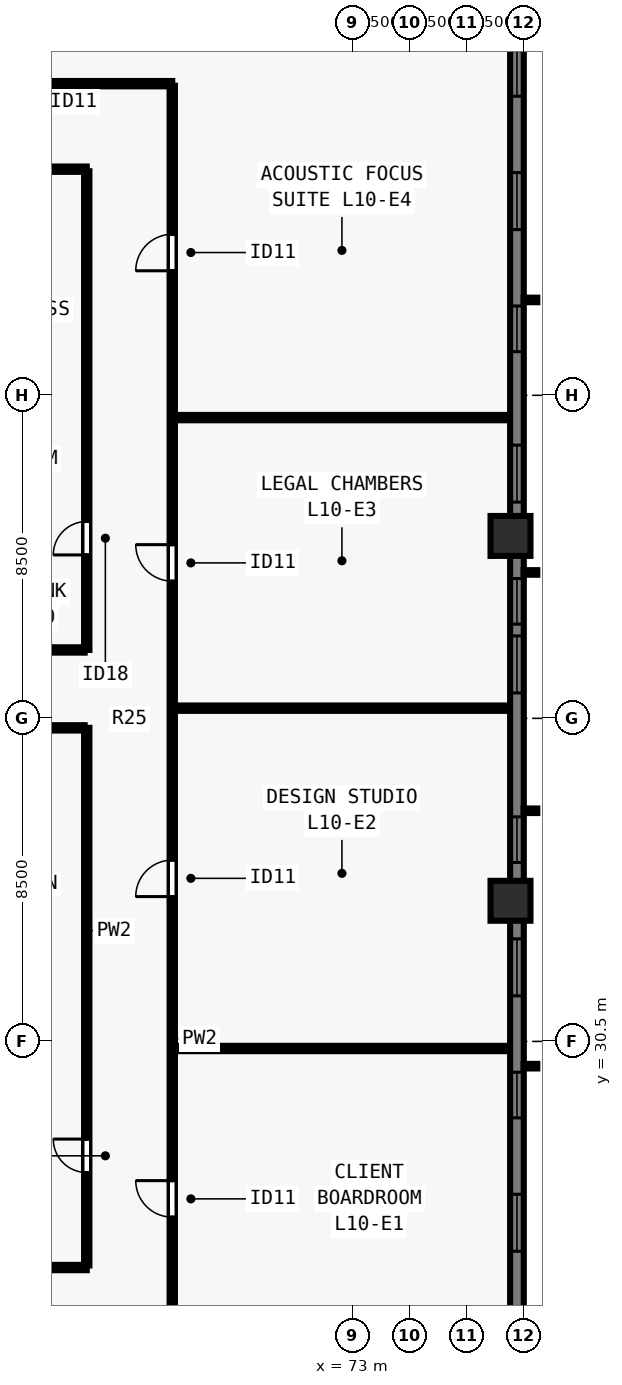
"""IFC4 building model, lengths in metres.
Left out: names, types, materials, properties, quantities, classifications, styles, units other than length and angle.
Written with IfcOpenShell. Run it as: python <this file> out.ifc"""

import sys

from ifc_helpers import new_model, si_unit, direction, frame, frame_2d, origin, origin_2d, place, context, subcontext, project, spatial, rectangle, extrude, element, fill, save


model = new_model("IFC4")
c1 = context("Model", 3, precision=1e-05, world=origin(), true_north=direction((0.0, 1.0)))
c2 = subcontext(c1, "Body", "Model", "MODEL_VIEW")
j1 = project(units=[si_unit("LENGTHUNIT", "METRE"), si_unit("PLANEANGLEUNIT", "RADIAN")], contexts=[c1])
p1 = place(None, origin())
s1 = spatial("IfcSite", under=j1, at=p1, CompositionType="ELEMENT")
p2 = place(p1, origin())
s2 = spatial("IfcBuilding", under=s1, at=p2, CompositionType="ELEMENT")
p3 = place(p2, frame((0.0, 0.0, 41.0)))
s3 = spatial("IfcBuildingStorey", under=s2, at=p3, CompositionType="ELEMENT", Elevation=41.0)
for number, where, z_axis, x_axis in (
    (1, (77.15, 34.2, 0.0), (0.0, 0.0, 1.0), (0.0, 1.0, 0.0)),
    (2, (77.15, 43.8, 0.0), (0.0, 0.0, 1.0), (0.0, 1.0, 0.0)),
):
    element("IfcColumn", number, at=place(p3, frame(where, z_axis=z_axis, x_axis=x_axis)), inside=s3, PredefinedType="COLUMN", context=c2, shape_type="SweptSolid", body=[
        extrude(rectangle(XDim=1.05, YDim=1.05, at=origin_2d()), origin(), (0.0, 0.0, 1.0), 3.5),
    ])
p4 = place(p3, frame((77.32, 61.5, 0.0), z_axis=(0.0, 0.0, 1.0), x_axis=(0.0, -1.0, 0.0)))
e3 = element("IfcWall", 3, at=p4, inside=s3, PredefinedType="SOLIDWALL", context=c2, shape_type="SweptSolid", body=[
    extrude(rectangle(XDim=44.662, YDim=0.36, at=frame_2d((22.331, 0.0))), origin(), (0.0, 0.0, 1.0), 3.28),
])
p5 = place(p4, frame((4.93, 0.0, 0.8)))
e4 = element("IfcOpeningElement", 4, at=p5, cuts=e3, PredefinedType="OPENING", context=c2, shape_type="SweptSolid", body=[
    extrude(rectangle(XDim=1.2, YDim=1.544, at=frame_2d((0.6, 0.772))), frame((0.0, 0.19, 0.0), z_axis=(0.0, -1.0, 0.0), x_axis=(1.0, 0.0, 0.0)), (0.0, 0.0, 1.0), 0.38),
])
p6 = place(p4, frame((8.14, 0.0, 0.8)))
e5 = element("IfcOpeningElement", 5, at=p6, cuts=e3, PredefinedType="OPENING", context=c2, shape_type="SweptSolid", body=[
    extrude(rectangle(XDim=1.5, YDim=1.544, at=frame_2d((0.75, 0.772))), frame((0.0, 0.19, 0.0), z_axis=(0.0, -1.0, 0.0), x_axis=(1.0, 0.0, 0.0)), (0.0, 0.0, 1.0), 0.38),
])
p7 = place(p4, frame((11.65, 0.0, 0.8)))
e6 = element("IfcOpeningElement", 6, at=p7, cuts=e3, PredefinedType="OPENING", context=c2, shape_type="SweptSolid", body=[
    extrude(rectangle(XDim=1.2, YDim=1.544, at=frame_2d((0.6, 0.772))), frame((0.0, 0.19, 0.0), z_axis=(0.0, -1.0, 0.0), x_axis=(1.0, 0.0, 0.0)), (0.0, 0.0, 1.0), 0.38),
])
p8 = place(p4, frame((15.311, 0.0, 0.8)))
e7 = element("IfcOpeningElement", 7, at=p8, cuts=e3, PredefinedType="OPENING", context=c2, shape_type="SweptSolid", body=[
    extrude(rectangle(XDim=1.5, YDim=1.544, at=frame_2d((0.75, 0.772))), frame((0.0, 0.19, 0.0), z_axis=(0.0, -1.0, 0.0), x_axis=(1.0, 0.0, 0.0)), (0.0, 0.0, 1.0), 0.38),
])
p9 = place(p4, frame((18.821, 0.0, 0.8)))
e8 = element("IfcOpeningElement", 8, at=p9, cuts=e3, PredefinedType="OPENING", context=c2, shape_type="SweptSolid", body=[
    extrude(rectangle(XDim=1.2, YDim=1.544, at=frame_2d((0.6, 0.772))), frame((0.0, 0.19, 0.0), z_axis=(0.0, -1.0, 0.0), x_axis=(1.0, 0.0, 0.0)), (0.0, 0.0, 1.0), 0.38),
])
p10 = place(p4, frame((20.331, 0.0, 0.8)))
e9 = element("IfcOpeningElement", 9, at=p10, cuts=e3, PredefinedType="OPENING", context=c2, shape_type="SweptSolid", body=[
    extrude(rectangle(XDim=1.5, YDim=1.544, at=frame_2d((0.75, 0.772))), frame((0.0, 0.19, 0.0), z_axis=(0.0, -1.0, 0.0), x_axis=(1.0, 0.0, 0.0)), (0.0, 0.0, 1.0), 0.38),
])
p11 = place(p4, frame((25.091, 0.0, 0.8)))
e10 = element("IfcOpeningElement", 10, at=p11, cuts=e3, PredefinedType="OPENING", context=c2, shape_type="SweptSolid", body=[
    extrude(rectangle(XDim=1.2, YDim=1.544, at=frame_2d((0.6, 0.772))), frame((0.0, 0.19, 0.0), z_axis=(0.0, -1.0, 0.0), x_axis=(1.0, 0.0, 0.0)), (0.0, 0.0, 1.0), 0.38),
])
p12 = place(p4, frame((28.302, 0.0, 0.8)))
e11 = element("IfcOpeningElement", 11, at=p12, cuts=e3, PredefinedType="OPENING", context=c2, shape_type="SweptSolid", body=[
    extrude(rectangle(XDim=1.5, YDim=1.544, at=frame_2d((0.75, 0.772))), frame((0.0, 0.19, 0.0), z_axis=(0.0, -1.0, 0.0), x_axis=(1.0, 0.0, 0.0)), (0.0, 0.0, 1.0), 0.38),
])
p13 = place(p4, frame((31.812, 0.0, 0.8)))
e12 = element("IfcOpeningElement", 12, at=p13, cuts=e3, PredefinedType="OPENING", context=c2, shape_type="SweptSolid", body=[
    extrude(rectangle(XDim=1.2, YDim=1.544, at=frame_2d((0.6, 0.772))), frame((0.0, 0.19, 0.0), z_axis=(0.0, -1.0, 0.0), x_axis=(1.0, 0.0, 0.0)), (0.0, 0.0, 1.0), 0.38),
])
p14 = place(p4, frame((35.022, 0.0, 0.8)))
e13 = element("IfcOpeningElement", 13, at=p14, cuts=e3, PredefinedType="OPENING", context=c2, shape_type="SweptSolid", body=[
    extrude(rectangle(XDim=1.5, YDim=1.544, at=frame_2d((0.75, 0.772))), frame((0.0, 0.19, 0.0), z_axis=(0.0, -1.0, 0.0), x_axis=(1.0, 0.0, 0.0)), (0.0, 0.0, 1.0), 0.38),
])
p15 = place(p4, frame((38.532, 0.0, 0.8)))
e14 = element("IfcOpeningElement", 14, at=p15, cuts=e3, PredefinedType="OPENING", context=c2, shape_type="SweptSolid", body=[
    extrude(rectangle(XDim=1.2, YDim=1.544, at=frame_2d((0.6, 0.772))), frame((0.0, 0.19, 0.0), z_axis=(0.0, -1.0, 0.0), x_axis=(1.0, 0.0, 0.0)), (0.0, 0.0, 1.0), 0.38),
])
p16 = place(p3, frame((35.75, 55.7, 0.0), z_axis=(0.0, 0.0, 1.0), x_axis=(1.0, 0.0, 0.0)))
e15 = element("IfcWall", 15, at=p16, inside=s3, PredefinedType="PARTITIONING", context=c2, shape_type="SweptSolid", body=[
    extrude(rectangle(XDim=32.5, YDim=0.14, at=frame_2d((16.25, 0.0))), origin(), (0.0, 0.0, 1.0), 3.28),
])
p17 = place(p16, frame((3.154, 0.0, 0.0)))
e16 = element("IfcOpeningElement", 16, at=p17, cuts=e15, PredefinedType="OPENING", context=c2, shape_type="SweptSolid", body=[
    extrude(rectangle(XDim=0.96, YDim=2.12, at=frame_2d((0.48, 1.06))), frame((0.0, 0.08, 0.0), z_axis=(0.0, -1.0, 0.0), x_axis=(1.0, 0.0, 0.0)), (0.0, 0.0, 1.0), 0.16),
])
p18 = place(p16, frame((27.834, 0.0, 0.0)))
e17 = element("IfcOpeningElement", 17, at=p18, cuts=e15, PredefinedType="OPENING", context=c2, shape_type="SweptSolid", body=[
    extrude(rectangle(XDim=0.96, YDim=2.12, at=frame_2d((0.48, 1.06))), frame((0.0, 0.08, 0.0), z_axis=(0.0, -1.0, 0.0), x_axis=(1.0, 0.0, 0.0)), (0.0, 0.0, 1.0), 0.16),
])
p19 = place(p3, frame((68.25, 22.355, 0.0), z_axis=(0.0, 0.0, 1.0), x_axis=(0.0, 1.0, 0.0)))
e18 = element("IfcWall", 18, at=p19, inside=s3, PredefinedType="PARTITIONING", context=c2, shape_type="SweptSolid", body=[
    extrude(rectangle(XDim=33.29, YDim=0.14, at=frame_2d((16.645, 0.0))), origin(), (0.0, 0.0, 1.0), 3.28),
])
p20 = place(p19, frame((3.522, 0.0, 0.0)))
e19 = element("IfcOpeningElement", 19, at=p20, cuts=e18, PredefinedType="OPENING", context=c2, shape_type="SweptSolid", body=[
    extrude(rectangle(XDim=0.96, YDim=2.12, at=frame_2d((0.48, 1.06))), frame((0.0, 0.08, 0.0), z_axis=(0.0, -1.0, 0.0), x_axis=(1.0, 0.0, 0.0)), (0.0, 0.0, 1.0), 0.16),
])
p21 = place(p19, frame((11.956, 0.0, 0.0)))
e20 = element("IfcOpeningElement", 20, at=p21, cuts=e18, PredefinedType="OPENING", context=c2, shape_type="SweptSolid", body=[
    extrude(rectangle(XDim=0.96, YDim=2.12, at=frame_2d((0.48, 1.06))), frame((0.0, 0.08, 0.0), z_axis=(0.0, -1.0, 0.0), x_axis=(1.0, 0.0, 0.0)), (0.0, 0.0, 1.0), 0.16),
])
p22 = place(p19, frame((20.256, 0.0, 0.0)))
e21 = element("IfcOpeningElement", 21, at=p22, cuts=e18, PredefinedType="OPENING", context=c2, shape_type="SweptSolid", body=[
    extrude(rectangle(XDim=0.96, YDim=2.12, at=frame_2d((0.48, 1.06))), frame((0.0, 0.08, 0.0), z_axis=(0.0, -1.0, 0.0), x_axis=(1.0, 0.0, 0.0)), (0.0, 0.0, 1.0), 0.16),
])
p23 = place(p19, frame((28.422, 0.0, 0.0)))
e22 = element("IfcOpeningElement", 22, at=p23, cuts=e18, PredefinedType="OPENING", context=c2, shape_type="SweptSolid", body=[
    extrude(rectangle(XDim=0.96, YDim=2.12, at=frame_2d((0.48, 1.06))), frame((0.0, 0.08, 0.0), z_axis=(0.0, -1.0, 0.0), x_axis=(1.0, 0.0, 0.0)), (0.0, 0.0, 1.0), 0.16),
])
p24 = place(p3, frame((38.0, 24.55, 0.0), z_axis=(0.0, 0.0, 1.0), x_axis=(1.0, 0.0, 0.0)))
e23 = element("IfcWall", 23, at=p24, inside=s3, PredefinedType="PARTITIONING", context=c2, shape_type="SweptSolid", body=[
    extrude(rectangle(XDim=28.0, YDim=0.14, at=frame_2d((14.0, 0.0))), origin(), (0.0, 0.0, 1.0), 3.28),
])
p25 = place(p24, frame((1.2, 0.0, 0.0)))
e24 = element("IfcOpeningElement", 24, at=p25, cuts=e23, PredefinedType="OPENING", context=c2, shape_type="SweptSolid", body=[
    extrude(rectangle(XDim=0.88, YDim=2.1, at=frame_2d((0.44, 1.05))), frame((0.0, 0.08, 0.0), z_axis=(0.0, -1.0, 0.0), x_axis=(1.0, 0.0, 0.0)), (0.0, 0.0, 1.0), 0.16),
])
p26 = place(p24, frame((10.5, 0.0, 0.0)))
e25 = element("IfcOpeningElement", 25, at=p26, cuts=e23, PredefinedType="OPENING", context=c2, shape_type="SweptSolid", body=[
    extrude(rectangle(XDim=0.88, YDim=2.1, at=frame_2d((0.44, 1.05))), frame((0.0, 0.08, 0.0), z_axis=(0.0, -1.0, 0.0), x_axis=(1.0, 0.0, 0.0)), (0.0, 0.0, 1.0), 0.16),
])
p27 = place(p24, frame((21.0, 0.0, 0.0)))
e26 = element("IfcOpeningElement", 26, at=p27, cuts=e23, PredefinedType="OPENING", context=c2, shape_type="SweptSolid", body=[
    extrude(rectangle(XDim=0.88, YDim=2.1, at=frame_2d((0.44, 1.05))), frame((0.0, 0.08, 0.0), z_axis=(0.0, -1.0, 0.0), x_axis=(1.0, 0.0, 0.0)), (0.0, 0.0, 1.0), 0.16),
])
p28 = place(p3, frame((38.0, 53.45, 0.0), z_axis=(0.0, 0.0, 1.0), x_axis=(1.0, 0.0, 0.0)))
e27 = element("IfcWall", 27, at=p28, inside=s3, PredefinedType="PARTITIONING", context=c2, shape_type="SweptSolid", body=[
    extrude(rectangle(XDim=28.0, YDim=0.14, at=frame_2d((14.0, 0.0))), origin(), (0.0, 0.0, 1.0), 3.28),
])
p29 = place(p28, frame((2.2, 0.0, 0.0)))
e28 = element("IfcOpeningElement", 28, at=p29, cuts=e27, PredefinedType="OPENING", context=c2, shape_type="SweptSolid", body=[
    extrude(rectangle(XDim=0.88, YDim=2.1, at=frame_2d((0.44, 1.05))), frame((0.0, 0.08, 0.0), z_axis=(0.0, -1.0, 0.0), x_axis=(1.0, 0.0, 0.0)), (0.0, 0.0, 1.0), 0.16),
])
p30 = place(p28, frame((14.5, 0.0, 0.0)))
e29 = element("IfcOpeningElement", 29, at=p30, cuts=e27, PredefinedType="OPENING", context=c2, shape_type="SweptSolid", body=[
    extrude(rectangle(XDim=0.88, YDim=2.1, at=frame_2d((0.44, 1.05))), frame((0.0, 0.08, 0.0), z_axis=(0.0, -1.0, 0.0), x_axis=(1.0, 0.0, 0.0)), (0.0, 0.0, 1.0), 0.16),
])
p31 = place(p28, frame((24.0, 0.0, 0.0)))
e30 = element("IfcOpeningElement", 30, at=p31, cuts=e27, PredefinedType="OPENING", context=c2, shape_type="SweptSolid", body=[
    extrude(rectangle(XDim=0.88, YDim=2.1, at=frame_2d((0.44, 1.05))), frame((0.0, 0.08, 0.0), z_axis=(0.0, -1.0, 0.0), x_axis=(1.0, 0.0, 0.0)), (0.0, 0.0, 1.0), 0.16),
])
p32 = place(p3, frame((66.0, 24.605, 0.0), z_axis=(0.0, 0.0, 1.0), x_axis=(0.0, 1.0, 0.0)))
e31 = element("IfcWall", 31, at=p32, inside=s3, PredefinedType="PARTITIONING", context=c2, shape_type="SweptSolid", body=[
    extrude(rectangle(XDim=14.145, YDim=0.14, at=frame_2d((7.073, 0.0))), origin(), (0.0, 0.0, 1.0), 3.28),
])
p33 = place(p32, frame((2.445, 0.0, 0.0)))
e32 = element("IfcOpeningElement", 32, at=p33, cuts=e31, PredefinedType="OPENING", context=c2, shape_type="SweptSolid", body=[
    extrude(rectangle(XDim=0.88, YDim=2.1, at=frame_2d((0.44, 1.05))), frame((0.0, 0.08, 0.0), z_axis=(0.0, -1.0, 0.0), x_axis=(1.0, 0.0, 0.0)), (0.0, 0.0, 1.0), 0.16),
])
p34 = place(p3, frame((66.0, 40.8, 0.0), z_axis=(0.0, 0.0, 1.0), x_axis=(0.0, 1.0, 0.0)))
e33 = element("IfcWall", 33, at=p34, inside=s3, PredefinedType="PARTITIONING", context=c2, shape_type="SweptSolid", body=[
    extrude(rectangle(XDim=12.595, YDim=0.14, at=frame_2d((6.297, 0.0))), origin(), (0.0, 0.0, 1.0), 3.28),
])
p35 = place(p34, frame((2.5, 0.0, 0.0)))
e34 = element("IfcOpeningElement", 34, at=p35, cuts=e33, PredefinedType="OPENING", context=c2, shape_type="SweptSolid", body=[
    extrude(rectangle(XDim=0.88, YDim=2.1, at=frame_2d((0.44, 1.05))), frame((0.0, 0.08, 0.0), z_axis=(0.0, -1.0, 0.0), x_axis=(1.0, 0.0, 0.0)), (0.0, 0.0, 1.0), 0.16),
])
for number, where, z_axis, x_axis in (
    (35, (60.76, 38.75, 0.0), (0.0, 0.0, 1.0), (1.0, 0.0, 0.0)),
    (36, (60.76, 40.8, 0.0), (0.0, 0.0, 1.0), (1.0, 0.0, 0.0)),
):
    element("IfcWall", number, at=place(p3, frame(where, z_axis=z_axis, x_axis=x_axis)), inside=s3, PredefinedType="PARTITIONING", context=c2, shape_type="SweptSolid", body=[
        extrude(rectangle(XDim=5.185, YDim=0.14, at=frame_2d((2.593, 0.0))), origin(), (0.0, 0.0, 1.0), 3.28),
    ])
for number, where, z_axis, x_axis in (
    (37, (68.35, 30.313, 0.0), (0.0, 0.0, 1.0), (1.0, 0.0, 0.0)),
    (38, (68.35, 39.268, 0.0), (0.0, 0.0, 1.0), (1.0, 0.0, 0.0)),
    (39, (68.35, 46.913, 0.0), (0.0, 0.0, 1.0), (1.0, 0.0, 0.0)),
):
    element("IfcWall", number, at=place(p3, frame(where, z_axis=z_axis, x_axis=x_axis)), inside=s3, PredefinedType="PARTITIONING", context=c2, shape_type="SweptSolid", body=[
        extrude(rectangle(XDim=8.73, YDim=0.14, at=frame_2d((4.365, 0.0))), origin(), (0.0, 0.0, 1.0), 3.28),
    ])
p36 = place(p5, origin())
e40 = element("IfcWindow", 40, at=p36, inside=s3, PartitioningType="SINGLE_PANEL", PredefinedType="WINDOW", context=c2, shape_type="SweptSolid", body=[
    extrude(rectangle(XDim=1.2, YDim=1.544, at=frame_2d((0.6, 0.772))), frame((0.0, -0.05, 0.0), z_axis=(0.0, -1.0, 0.0), x_axis=(1.0, 0.0, 0.0)), (0.0, 0.0, 1.0), 0.06),
])
fill(e4, e40)
p37 = place(p6, origin())
e41 = element("IfcWindow", 41, at=p37, inside=s3, PartitioningType="SINGLE_PANEL", PredefinedType="WINDOW", context=c2, shape_type="SweptSolid", body=[
    extrude(rectangle(XDim=1.5, YDim=1.544, at=frame_2d((0.75, 0.772))), frame((0.0, -0.05, 0.0), z_axis=(0.0, -1.0, 0.0), x_axis=(1.0, 0.0, 0.0)), (0.0, 0.0, 1.0), 0.06),
])
fill(e5, e41)
p38 = place(p7, origin())
e42 = element("IfcWindow", 42, at=p38, inside=s3, PartitioningType="SINGLE_PANEL", PredefinedType="WINDOW", context=c2, shape_type="SweptSolid", body=[
    extrude(rectangle(XDim=1.2, YDim=1.544, at=frame_2d((0.6, 0.772))), frame((0.0, -0.05, 0.0), z_axis=(0.0, -1.0, 0.0), x_axis=(1.0, 0.0, 0.0)), (0.0, 0.0, 1.0), 0.06),
])
fill(e6, e42)
p39 = place(p8, origin())
e43 = element("IfcWindow", 43, at=p39, inside=s3, PartitioningType="SINGLE_PANEL", PredefinedType="WINDOW", context=c2, shape_type="SweptSolid", body=[
    extrude(rectangle(XDim=1.5, YDim=1.544, at=frame_2d((0.75, 0.772))), frame((0.0, -0.05, 0.0), z_axis=(0.0, -1.0, 0.0), x_axis=(1.0, 0.0, 0.0)), (0.0, 0.0, 1.0), 0.06),
])
fill(e7, e43)
p40 = place(p9, origin())
e44 = element("IfcWindow", 44, at=p40, inside=s3, PartitioningType="SINGLE_PANEL", PredefinedType="WINDOW", context=c2, shape_type="SweptSolid", body=[
    extrude(rectangle(XDim=1.2, YDim=1.544, at=frame_2d((0.6, 0.772))), frame((0.0, -0.05, 0.0), z_axis=(0.0, -1.0, 0.0), x_axis=(1.0, 0.0, 0.0)), (0.0, 0.0, 1.0), 0.06),
])
fill(e8, e44)
p41 = place(p10, origin())
e45 = element("IfcWindow", 45, at=p41, inside=s3, PartitioningType="SINGLE_PANEL", PredefinedType="WINDOW", context=c2, shape_type="SweptSolid", body=[
    extrude(rectangle(XDim=1.5, YDim=1.544, at=frame_2d((0.75, 0.772))), frame((0.0, -0.05, 0.0), z_axis=(0.0, -1.0, 0.0), x_axis=(1.0, 0.0, 0.0)), (0.0, 0.0, 1.0), 0.06),
])
fill(e9, e45)
p42 = place(p11, origin())
e46 = element("IfcWindow", 46, at=p42, inside=s3, PartitioningType="SINGLE_PANEL", PredefinedType="WINDOW", context=c2, shape_type="SweptSolid", body=[
    extrude(rectangle(XDim=1.2, YDim=1.544, at=frame_2d((0.6, 0.772))), frame((0.0, -0.05, 0.0), z_axis=(0.0, -1.0, 0.0), x_axis=(1.0, 0.0, 0.0)), (0.0, 0.0, 1.0), 0.06),
])
fill(e10, e46)
p43 = place(p12, origin())
e47 = element("IfcWindow", 47, at=p43, inside=s3, PartitioningType="SINGLE_PANEL", PredefinedType="WINDOW", context=c2, shape_type="SweptSolid", body=[
    extrude(rectangle(XDim=1.5, YDim=1.544, at=frame_2d((0.75, 0.772))), frame((0.0, -0.05, 0.0), z_axis=(0.0, -1.0, 0.0), x_axis=(1.0, 0.0, 0.0)), (0.0, 0.0, 1.0), 0.06),
])
fill(e11, e47)
p44 = place(p13, origin())
e48 = element("IfcWindow", 48, at=p44, inside=s3, PartitioningType="SINGLE_PANEL", PredefinedType="WINDOW", context=c2, shape_type="SweptSolid", body=[
    extrude(rectangle(XDim=1.2, YDim=1.544, at=frame_2d((0.6, 0.772))), frame((0.0, -0.05, 0.0), z_axis=(0.0, -1.0, 0.0), x_axis=(1.0, 0.0, 0.0)), (0.0, 0.0, 1.0), 0.06),
])
fill(e12, e48)
p45 = place(p14, origin())
e49 = element("IfcWindow", 49, at=p45, inside=s3, PartitioningType="SINGLE_PANEL", PredefinedType="WINDOW", context=c2, shape_type="SweptSolid", body=[
    extrude(rectangle(XDim=1.5, YDim=1.544, at=frame_2d((0.75, 0.772))), frame((0.0, -0.05, 0.0), z_axis=(0.0, -1.0, 0.0), x_axis=(1.0, 0.0, 0.0)), (0.0, 0.0, 1.0), 0.06),
])
fill(e13, e49)
p46 = place(p33, origin())
e50 = element("IfcDoor", 50, at=p46, inside=s3, OperationType="SINGLE_SWING_RIGHT", PredefinedType="DOOR", context=c2, shape_type="SweptSolid", body=[
    extrude(rectangle(XDim=0.88, YDim=2.1, at=frame_2d((0.44, 1.05))), frame((0.0, 0.025, 0.0), z_axis=(0.0, -1.0, 0.0), x_axis=(1.0, 0.0, 0.0)), (0.0, 0.0, 1.0), 0.05),
])
fill(e32, e50)
p47 = place(p35, origin())
e51 = element("IfcDoor", 51, at=p47, inside=s3, OperationType="SINGLE_SWING_LEFT", PredefinedType="DOOR", context=c2, shape_type="SweptSolid", body=[
    extrude(rectangle(XDim=0.88, YDim=2.1, at=frame_2d((0.44, 1.05))), frame((0.0, 0.025, 0.0), z_axis=(0.0, -1.0, 0.0), x_axis=(1.0, 0.0, 0.0)), (0.0, 0.0, 1.0), 0.05),
])
fill(e34, e51)
p48 = place(p20, origin())
e52 = element("IfcDoor", 52, at=p48, inside=s3, OperationType="SINGLE_SWING_RIGHT", PredefinedType="DOOR", context=c2, shape_type="SweptSolid", body=[
    extrude(rectangle(XDim=0.96, YDim=2.12, at=frame_2d((0.48, 1.06))), frame((0.0, 0.025, 0.0), z_axis=(0.0, -1.0, 0.0), x_axis=(1.0, 0.0, 0.0)), (0.0, 0.0, 1.0), 0.05),
])
fill(e19, e52)
p49 = place(p21, origin())
e53 = element("IfcDoor", 53, at=p49, inside=s3, OperationType="SINGLE_SWING_LEFT", PredefinedType="DOOR", context=c2, shape_type="SweptSolid", body=[
    extrude(rectangle(XDim=0.96, YDim=2.12, at=frame_2d((0.48, 1.06))), frame((0.0, 0.025, 0.0), z_axis=(0.0, -1.0, 0.0), x_axis=(1.0, 0.0, 0.0)), (0.0, 0.0, 1.0), 0.05),
])
fill(e20, e53)
p50 = place(p22, origin())
e54 = element("IfcDoor", 54, at=p50, inside=s3, OperationType="SINGLE_SWING_RIGHT", PredefinedType="DOOR", context=c2, shape_type="SweptSolid", body=[
    extrude(rectangle(XDim=0.96, YDim=2.12, at=frame_2d((0.48, 1.06))), frame((0.0, 0.025, 0.0), z_axis=(0.0, -1.0, 0.0), x_axis=(1.0, 0.0, 0.0)), (0.0, 0.0, 1.0), 0.05),
])
fill(e21, e54)
p51 = place(p23, origin())
e55 = element("IfcDoor", 55, at=p51, inside=s3, OperationType="SINGLE_SWING_LEFT", PredefinedType="DOOR", context=c2, shape_type="SweptSolid", body=[
    extrude(rectangle(XDim=0.96, YDim=2.12, at=frame_2d((0.48, 1.06))), frame((0.0, 0.025, 0.0), z_axis=(0.0, -1.0, 0.0), x_axis=(1.0, 0.0, 0.0)), (0.0, 0.0, 1.0), 0.05),
])
fill(e22, e55)
save(model, sys.argv[1])
